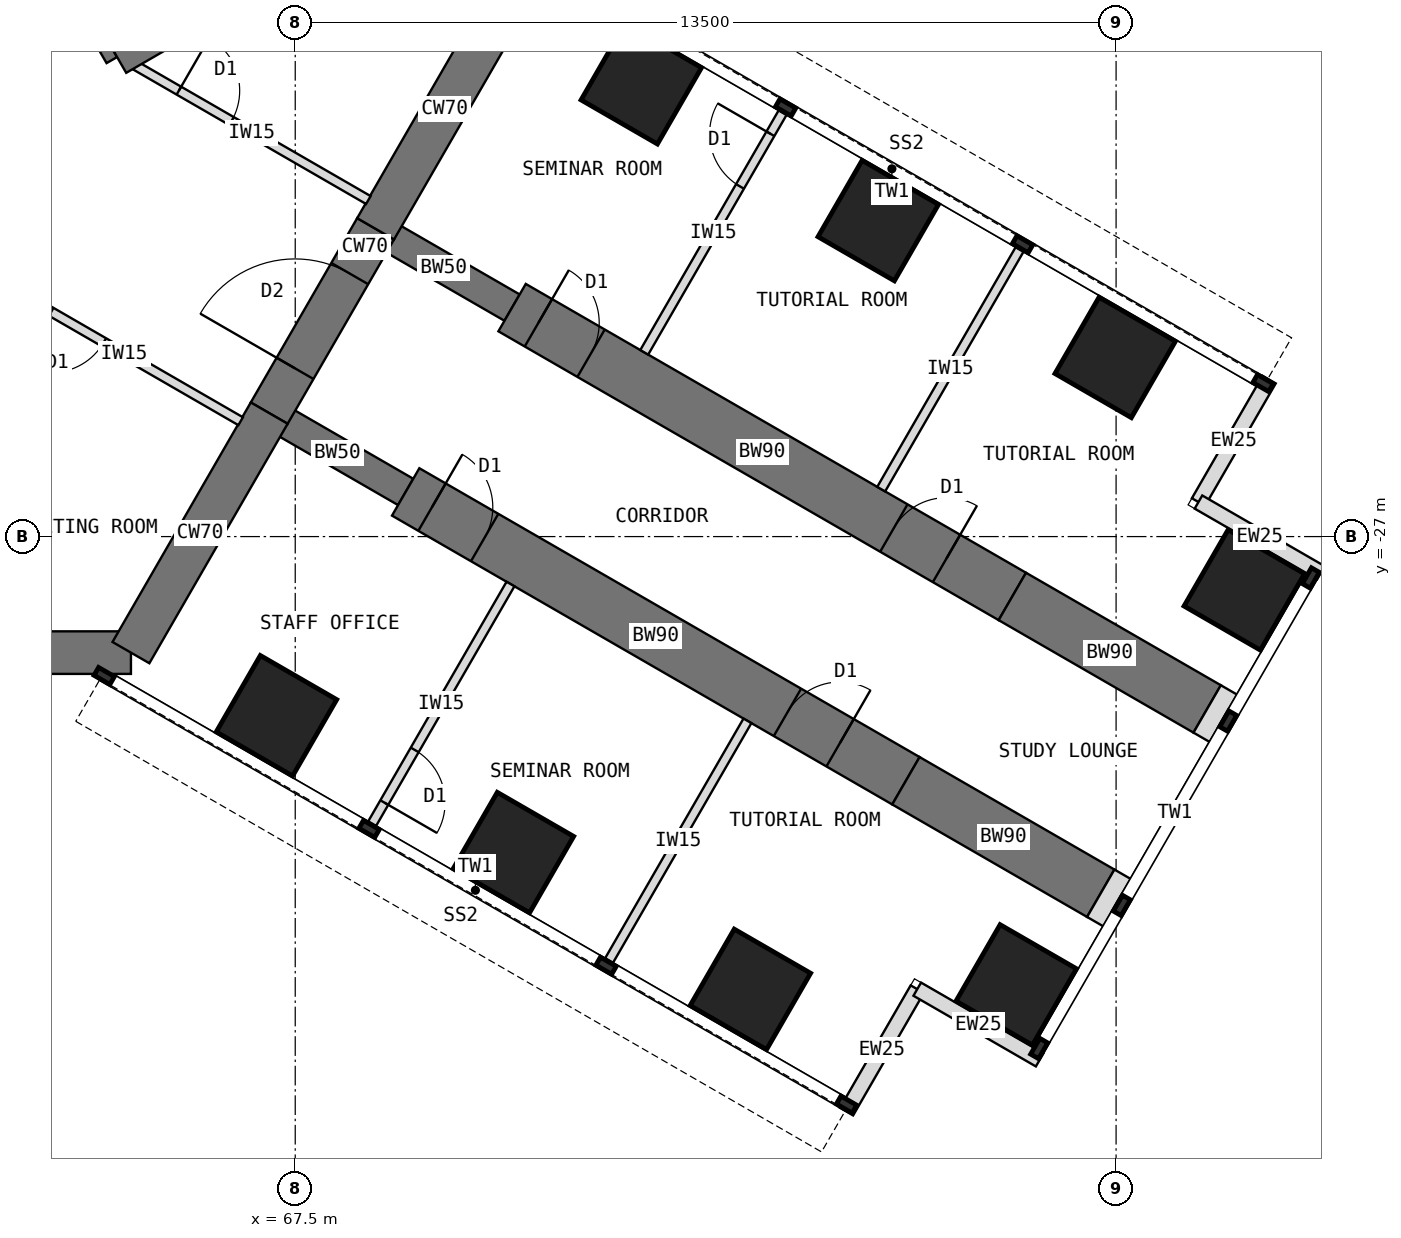
"""IFC4 building model, lengths in metres.
Left out: names, types, materials, properties, quantities, classifications, styles, units other than length and angle.
Written with IfcOpenShell. Run it as: python <this file> out.ifc"""

import sys

from ifc_helpers import new_model, si_unit, direction, frame, frame_2d, origin, origin_2d, place, context, subcontext, project, spatial, rectangle, extrude, element, fill, save


model = new_model("IFC4")
c1 = context("Model", 3, precision=1e-05, world=origin(), true_north=direction((0.0, 1.0)))
c2 = subcontext(c1, "Body", "Model", "MODEL_VIEW")
j1 = project(units=[si_unit("LENGTHUNIT", "METRE"), si_unit("PLANEANGLEUNIT", "RADIAN")], contexts=[c1])
p1 = place(None, origin())
s1 = spatial("IfcSite", under=j1, at=p1, CompositionType="ELEMENT")
p2 = place(p1, origin())
s2 = spatial("IfcBuilding", under=s1, at=p2, CompositionType="ELEMENT")
p3 = place(p2, frame((0.0, 0.0, 60.5)))
s3 = spatial("IfcBuildingStorey", under=s2, at=p3, CompositionType="ELEMENT", Elevation=60.5)
p4 = place(p3, frame((52.202, -28.908, 0.0), z_axis=(0.0, 0.0, 1.0), x_axis=(1.0, 0.0, 0.0)))
e1 = element("IfcWall", 1, at=p4, inside=s3, PredefinedType="SHEAR", context=c2, shape_type="SweptSolid", body=[
    extrude(rectangle(XDim=12.596, YDim=0.7, at=frame_2d((6.298, 0.0))), origin(), (0.0, 0.0, 1.0), 4.0),
])
p5 = place(p3, frame((64.798, -28.908, 0.0), z_axis=(0.0, 0.0, 1.0), x_axis=(0.499984222037, 0.866034513004, 0.0)))
e2 = element("IfcWall", 2, at=p5, inside=s3, PredefinedType="SHEAR", context=c2, shape_type="SweptSolid", body=[
    extrude(rectangle(XDim=4.548, YDim=0.7, at=frame_2d((2.274, 0.0))), origin(), (0.0, 0.0, 1.0), 4.0),
])
p6 = place(p3, frame((67.072, -24.97, 0.0), z_axis=(0.0, 0.0, 1.0), x_axis=(0.500010275428, 0.866019471182, 0.0)))
e3 = element("IfcWall", 3, at=p6, inside=s3, PredefinedType="SHEAR", context=c2, shape_type="SweptSolid", body=[
    extrude(rectangle(XDim=3.5, YDim=0.7, at=frame_2d((1.75, 0.0))), origin(), (0.0, 0.0, 1.0), 4.0),
])
p7 = place(p6, frame((0.85, 0.0, 0.0)))
e4 = element("IfcOpeningElement", 4, at=p7, cuts=e3, PredefinedType="OPENING", context=c2, shape_type="SweptSolid", body=[
    extrude(rectangle(XDim=1.8, YDim=2.1, at=frame_2d((0.9, 1.05))), frame((0.0, 0.36, 0.0), z_axis=(0.0, -1.0, 0.0), x_axis=(1.0, 0.0, 0.0)), (0.0, 0.0, 1.0), 0.72),
])
p8 = place(p3, frame((68.822, -21.939, 0.0), z_axis=(0.0, 0.0, 1.0), x_axis=(0.500024481964, 0.866011268655, 0.0)))
e5 = element("IfcWall", 5, at=p8, inside=s3, PredefinedType="SHEAR", context=c2, shape_type="SweptSolid", body=[
    extrude(rectangle(XDim=4.548, YDim=0.7, at=frame_2d((2.274, 0.0))), origin(), (0.0, 0.0, 1.0), 4.0),
])
p9 = place(p3, frame((68.822, -21.939, 0.0), z_axis=(0.0, 0.0, 1.0), x_axis=(0.866072649678, -0.499918158782, 0.0)))
e6 = element("IfcWall", 6, at=p9, inside=s3, PredefinedType="SHEAR", context=c2, shape_type="SweptSolid", body=[
    extrude(rectangle(XDim=2.592, YDim=0.5, at=frame_2d((1.296, 0.0))), origin(), (0.0, 0.0, 1.0), 4.0),
])
p10 = place(p3, frame((71.066, -23.234, 0.0), z_axis=(0.0, 0.0, 1.0), x_axis=(0.86602681393, -0.499997557548, 0.0)))
e7 = element("IfcWall", 7, at=p10, inside=s3, PredefinedType="SHEAR", context=c2, shape_type="SweptSolid", body=[
    extrude(rectangle(XDim=9.5, YDim=0.9, at=frame_2d((4.75, 0.0))), origin(), (0.0, 0.0, 1.0), 4.0),
])
p11 = place(p10, frame((0.5, 0.0, 0.0)))
e8 = element("IfcOpeningElement", 8, at=p11, cuts=e7, PredefinedType="OPENING", context=c2, shape_type="SweptSolid", body=[
    extrude(rectangle(XDim=1.0, YDim=2.1, at=frame_2d((0.5, 1.05))), frame((0.0, 0.46, 0.0), z_axis=(0.0, -1.0, 0.0), x_axis=(1.0, 0.0, 0.0)), (0.0, 0.0, 1.0), 0.92),
])
p12 = place(p10, frame((7.25, 0.0, 0.0)))
e9 = element("IfcOpeningElement", 9, at=p12, cuts=e7, PredefinedType="OPENING", context=c2, shape_type="SweptSolid", body=[
    extrude(rectangle(XDim=1.0, YDim=2.1, at=frame_2d((0.5, 1.05))), frame((0.0, 0.46, 0.0), z_axis=(0.0, -1.0, 0.0), x_axis=(1.0, 0.0, 0.0)), (0.0, 0.0, 1.0), 0.92),
])
p13 = place(p3, frame((79.294, -27.984, 0.0), z_axis=(0.0, 0.0, 1.0), x_axis=(0.866000971088, -0.500042316284, 0.0)))
e10 = element("IfcWall", 10, at=p13, inside=s3, PredefinedType="SHEAR", context=c2, shape_type="SweptSolid", body=[
    extrude(rectangle(XDim=3.7, YDim=0.9, at=frame_2d((1.85, 0.0))), origin(), (0.0, 0.0, 1.0), 4.0),
])
p14 = place(p3, frame((67.072, -24.97, 0.0), z_axis=(0.0, 0.0, 1.0), x_axis=(0.866031863473, -0.499988811324, 0.0)))
e11 = element("IfcWall", 11, at=p14, inside=s3, PredefinedType="SHEAR", context=c2, shape_type="SweptSolid", body=[
    extrude(rectangle(XDim=2.592, YDim=0.5, at=frame_2d((1.296, 0.0))), origin(), (0.0, 0.0, 1.0), 4.0),
])
p15 = place(p3, frame((69.316, -26.266, 0.0), z_axis=(0.0, 0.0, 1.0), x_axis=(0.86602681393, -0.499997557548, 0.0)))
e12 = element("IfcWall", 12, at=p15, inside=s3, PredefinedType="SHEAR", context=c2, shape_type="SweptSolid", body=[
    extrude(rectangle(XDim=9.5, YDim=0.9, at=frame_2d((4.75, 0.0))), origin(), (0.0, 0.0, 1.0), 4.0),
])
p16 = place(p15, frame((0.5, 0.0, 0.0)))
e13 = element("IfcOpeningElement", 13, at=p16, cuts=e12, PredefinedType="OPENING", context=c2, shape_type="SweptSolid", body=[
    extrude(rectangle(XDim=1.0, YDim=2.1, at=frame_2d((0.5, 1.05))), frame((0.0, 0.46, 0.0), z_axis=(0.0, -1.0, 0.0), x_axis=(1.0, 0.0, 0.0)), (0.0, 0.0, 1.0), 0.92),
])
p17 = place(p15, frame((7.25, 0.0, 0.0)))
e14 = element("IfcOpeningElement", 14, at=p17, cuts=e12, PredefinedType="OPENING", context=c2, shape_type="SweptSolid", body=[
    extrude(rectangle(XDim=1.0, YDim=2.1, at=frame_2d((0.5, 1.05))), frame((0.0, 0.46, 0.0), z_axis=(0.0, -1.0, 0.0), x_axis=(1.0, 0.0, 0.0)), (0.0, 0.0, 1.0), 0.92),
])
p18 = place(p3, frame((77.544, -31.016, 0.0), z_axis=(0.0, 0.0, 1.0), x_axis=(0.866029545028, -0.499992827086, 0.0)))
e15 = element("IfcWall", 15, at=p18, inside=s3, PredefinedType="SHEAR", context=c2, shape_type="SweptSolid", body=[
    extrude(rectangle(XDim=3.7, YDim=0.9, at=frame_2d((1.85, 0.0))), origin(), (0.0, 0.0, 1.0), 4.0),
])
for number, where, z_axis, x_axis in (
    (16, (73.191, -19.554, 0.0), (0.0, 0.0, 1.0), (0.5, 0.866, 0.0)),
    (17, (67.191, -29.946, 0.0), (0.0, 0.0, 1.0), (0.5, 0.866, 0.0)),
    (18, (77.088, -21.804, 0.0), (0.0, 0.0, 1.0), (0.5, 0.866, 0.0)),
    (19, (71.088, -32.196, 0.0), (0.0, 0.0, 1.0), (0.5, 0.866, 0.0)),
    (20, (80.986, -24.054, 0.0), (0.0, 0.0, 1.0), (0.5, 0.866, 0.0)),
    (21, (74.986, -34.446, 0.0), (0.0, 0.0, 1.0), (0.5, 0.866, 0.0)),
    (22, (83.108, -27.877, 0.0), (0.0, 0.0, 1.0), (0.5, 0.866, 0.0)),
    (23, (79.358, -34.373, 0.0), (0.0, 0.0, 1.0), (0.5, 0.866, 0.0)),
):
    element("IfcColumn", number, at=place(p3, frame(where, z_axis=z_axis, x_axis=x_axis)), inside=s3, PredefinedType="COLUMN", context=c2, shape_type="SweptSolid", body=[
        extrude(rectangle(XDim=1.45, YDim=1.45, at=origin_2d()), origin(), (0.0, 0.0, 1.0), 4.0),
    ])
for number, where, z_axis, x_axis in (
    (24, (83.517, -24.419, 0.0), (0.0, 0.0, 1.0), (-0.5, -0.866, 0.0)),
    (25, (82.355, -26.432, 0.0), (0.0, 0.0, 1.0), (0.866, -0.5, 0.0)),
    (26, (76.567, -36.456, 0.0), (0.0, 0.0, 1.0), (0.5, 0.866, 0.0)),
    (27, (77.73, -34.443, 0.0), (0.0, 0.0, 1.0), (0.866, -0.5, 0.0)),
):
    element("IfcWall", number, at=place(p3, frame(where, z_axis=z_axis, x_axis=x_axis)), inside=s3, PredefinedType="STANDARD", context=c2, shape_type="SweptSolid", body=[
        extrude(rectangle(XDim=2.325, YDim=0.25, at=frame_2d((1.163, 0.0))), origin(), (0.0, 0.0, 1.0), 3.8),
    ])
for number, where, z_axis, x_axis in (
    (28, (82.498, -29.834, 0.0), (0.0, 0.0, 1.0), (0.866, -0.5, 0.0)),
    (29, (80.748, -32.865, 0.0), (0.0, 0.0, 1.0), (0.866, -0.5, 0.0)),
):
    element("IfcWall", number, at=place(p3, frame(where, z_axis=z_axis, x_axis=x_axis)), inside=s3, PredefinedType="PARTITIONING", context=c2, shape_type="SweptSolid", body=[
        extrude(rectangle(XDim=0.31, YDim=0.9, at=frame_2d((0.155, 0.0))), origin(), (0.0, 0.0, 1.0), 3.8),
    ])
p19 = place(p3, frame((64.484, -19.164, 0.0), z_axis=(0.0, 0.0, 1.0), x_axis=(-0.49999894854, 0.866026010844, 0.0)))
e30 = element("IfcWall", 30, at=p19, inside=s3, PredefinedType="SHEAR", context=c2, shape_type="SweptSolid", body=[
    extrude(rectangle(XDim=8.0, YDim=0.2, at=frame_2d((4.0, 0.0))), origin(), (0.0, 0.0, 1.0), 4.0),
])
p20 = place(p19, frame((6.3, 0.0, 0.0)))
e31 = element("IfcOpeningElement", 31, at=p20, cuts=e30, PredefinedType="OPENING", context=c2, shape_type="SweptSolid", body=[
    extrude(rectangle(XDim=1.2, YDim=2.1, at=frame_2d((0.6, 1.05))), frame((0.0, 0.11, 0.0), z_axis=(0.0, -1.0, 0.0), x_axis=(1.0, 0.0, 0.0)), (0.0, 0.0, 1.0), 0.22),
])
p21 = place(p19, frame((0.9, 0.0, 0.0)))
e32 = element("IfcOpeningElement", 32, at=p21, cuts=e30, PredefinedType="OPENING", context=c2, shape_type="SweptSolid", body=[
    extrude(rectangle(XDim=1.1, YDim=2.2, at=frame_2d((0.55, 1.1))), frame((0.0, 0.11, 0.0), z_axis=(0.0, -1.0, 0.0), x_axis=(1.0, 0.0, 0.0)), (0.0, 0.0, 1.0), 0.22),
])
p22 = place(p19, frame((3.8, 0.0, 0.0)))
e33 = element("IfcOpeningElement", 33, at=p22, cuts=e30, PredefinedType="OPENING", context=c2, shape_type="SweptSolid", body=[
    extrude(rectangle(XDim=1.1, YDim=2.2, at=frame_2d((0.55, 1.1))), frame((0.0, 0.11, 0.0), z_axis=(0.0, -1.0, 0.0), x_axis=(1.0, 0.0, 0.0)), (0.0, 0.0, 1.0), 0.22),
])
p23 = place(p3, frame((64.62, -19.201, 0.0), z_axis=(0.0, 0.0, 1.0), x_axis=(0.866023886965, 0.500002627198, 0.0)))
e34 = element("IfcWall", 34, at=p23, inside=s3, PredefinedType="SHEAR", context=c2, shape_type="SweptSolid", body=[
    extrude(rectangle(XDim=5.858, YDim=0.4, at=frame_2d((2.929, 0.0))), origin(), (0.0, 0.0, 1.0), 4.0),
])
p24 = place(p3, frame((73.24, -23.97, 0.0), z_axis=(0.0, 0.0, 1.0), x_axis=(0.499982560684, 0.866035472144, 0.0)))
e35 = element("IfcWall", 35, at=p24, inside=s3, PredefinedType="PARTITIONING", context=c2, shape_type="SweptSolid", body=[
    extrude(rectangle(XDim=4.55, YDim=0.15, at=frame_2d((2.275, 0.0))), origin(), (0.0, 0.0, 1.0), 3.8),
])
p25 = place(p24, frame((3.15, 0.0, 0.0)))
e36 = element("IfcOpeningElement", 36, at=p25, cuts=e35, PredefinedType="OPENING", context=c2, shape_type="SweptSolid", body=[
    extrude(rectangle(XDim=1.0, YDim=2.1, at=frame_2d((0.5, 1.05))), frame((0.0, 0.085, 0.0), z_axis=(0.0, -1.0, 0.0), x_axis=(1.0, 0.0, 0.0)), (0.0, 0.0, 1.0), 0.17),
])
p26 = place(p3, frame((77.137, -26.22, 0.0), z_axis=(0.0, 0.0, 1.0), x_axis=(0.500022803284, 0.866012237902, 0.0)))
e37 = element("IfcWall", 37, at=p26, inside=s3, PredefinedType="PARTITIONING", context=c2, shape_type="SweptSolid", body=[
    extrude(rectangle(XDim=4.55, YDim=0.15, at=frame_2d((2.275, 0.0))), origin(), (0.0, 0.0, 1.0), 3.8),
])
p27 = place(p3, frame((71.04, -27.78, 0.0), z_axis=(0.0, 0.0, 1.0), x_axis=(-0.499982560684, -0.866035472144, 0.0)))
e38 = element("IfcWall", 38, at=p27, inside=s3, PredefinedType="PARTITIONING", context=c2, shape_type="SweptSolid", body=[
    extrude(rectangle(XDim=4.55, YDim=0.15, at=frame_2d((2.275, 0.0))), origin(), (0.0, 0.0, 1.0), 3.8),
])
p28 = place(p27, frame((3.15, 0.0, 0.0)))
e39 = element("IfcOpeningElement", 39, at=p28, cuts=e38, PredefinedType="OPENING", context=c2, shape_type="SweptSolid", body=[
    extrude(rectangle(XDim=1.0, YDim=2.1, at=frame_2d((0.5, 1.05))), frame((0.0, 0.085, 0.0), z_axis=(0.0, -1.0, 0.0), x_axis=(1.0, 0.0, 0.0)), (0.0, 0.0, 1.0), 0.17),
])
p29 = place(p3, frame((74.937, -30.03, 0.0), z_axis=(0.0, 0.0, 1.0), x_axis=(-0.499982560684, -0.866035472144, 0.0)))
e40 = element("IfcWall", 40, at=p29, inside=s3, PredefinedType="PARTITIONING", context=c2, shape_type="SweptSolid", body=[
    extrude(rectangle(XDim=4.55, YDim=0.15, at=frame_2d((2.275, 0.0))), origin(), (0.0, 0.0, 1.0), 3.8),
])
p30 = place(p3, frame((64.87, -19.253, 0.0), z_axis=(0.0, 0.0, 1.0), x_axis=(0.866021148949, -0.500007369519, 0.0)))
e41 = element("IfcWall", 41, at=p30, inside=s3, PredefinedType="PARTITIONING", context=c2, shape_type="SweptSolid", body=[
    extrude(rectangle(XDim=4.426, YDim=0.15, at=frame_2d((2.213, 0.0))), origin(), (0.0, 0.0, 1.0), 3.8),
])
p31 = place(p30, frame((0.828, 0.0, 0.0)))
e42 = element("IfcOpeningElement", 42, at=p31, cuts=e41, PredefinedType="OPENING", context=c2, shape_type="SweptSolid", body=[
    extrude(rectangle(XDim=1.0, YDim=2.1, at=frame_2d((0.5, 1.05))), frame((0.0, 0.085, 0.0), z_axis=(0.0, -1.0, 0.0), x_axis=(1.0, 0.0, 0.0)), (0.0, 0.0, 1.0), 0.17),
])
p32 = place(p3, frame((66.603, -25.103, 0.0), z_axis=(0.0, 0.0, 1.0), x_axis=(-0.866021148949, 0.500007369519, 0.0)))
e43 = element("IfcWall", 43, at=p32, inside=s3, PredefinedType="PARTITIONING", context=c2, shape_type="SweptSolid", body=[
    extrude(rectangle(XDim=4.426, YDim=0.15, at=frame_2d((2.213, 0.0))), origin(), (0.0, 0.0, 1.0), 3.8),
])
p33 = place(p32, frame((2.598, 0.0, 0.0)))
e44 = element("IfcOpeningElement", 44, at=p33, cuts=e43, PredefinedType="OPENING", context=c2, shape_type="SweptSolid", body=[
    extrude(rectangle(XDim=1.0, YDim=2.1, at=frame_2d((0.5, 1.05))), frame((0.0, 0.085, 0.0), z_axis=(0.0, -1.0, 0.0), x_axis=(1.0, 0.0, 0.0)), (0.0, 0.0, 1.0), 0.17),
])
p34 = place(p7, origin())
e45 = element("IfcDoor", 45, at=p34, inside=s3, OperationType="DOUBLE_DOOR_DOUBLE_SWING", PredefinedType="DOOR", context=c2, shape_type="SweptSolid", body=[
    extrude(rectangle(XDim=1.72, YDim=2.06, at=frame_2d((0.9, 1.03))), frame((0.0, 0.025, 0.0), z_axis=(0.0, -1.0, 0.0), x_axis=(1.0, 0.0, 0.0)), (0.0, 0.0, 1.0), 0.05),
    extrude(rectangle(XDim=0.04, YDim=2.1, at=frame_2d((0.02, 1.05))), frame((0.0, 0.35, 0.0), z_axis=(0.0, -1.0, 0.0), x_axis=(1.0, 0.0, 0.0)), (0.0, 0.0, 1.0), 0.699),
    extrude(rectangle(XDim=0.04, YDim=2.1, at=frame_2d((1.78, 1.05))), frame((0.0, 0.35, 0.0), z_axis=(0.0, -1.0, 0.0), x_axis=(1.0, 0.0, 0.0)), (0.0, 0.0, 1.0), 0.699),
    extrude(rectangle(XDim=1.72, YDim=0.04, at=frame_2d((0.9, 2.08))), frame((0.0, 0.35, 0.0), z_axis=(0.0, -1.0, 0.0), x_axis=(1.0, 0.0, 0.0)), (0.0, 0.0, 1.0), 0.699),
])
fill(e4, e45)
p35 = place(p25, origin())
e46 = element("IfcDoor", 46, at=p35, inside=s3, OperationType="SINGLE_SWING_RIGHT", PredefinedType="DOOR", context=c2, shape_type="SweptSolid", body=[
    extrude(rectangle(XDim=1.0, YDim=2.1, at=frame_2d((0.5, 1.05))), frame((0.0, 0.025, 0.0), z_axis=(0.0, -1.0, 0.0), x_axis=(1.0, 0.0, 0.0)), (0.0, 0.0, 1.0), 0.05),
])
fill(e36, e46)
p36 = place(p28, origin())
e47 = element("IfcDoor", 47, at=p36, inside=s3, OperationType="SINGLE_SWING_RIGHT", PredefinedType="DOOR", context=c2, shape_type="SweptSolid", body=[
    extrude(rectangle(XDim=1.0, YDim=2.1, at=frame_2d((0.5, 1.05))), frame((0.0, 0.025, 0.0), z_axis=(0.0, -1.0, 0.0), x_axis=(1.0, 0.0, 0.0)), (0.0, 0.0, 1.0), 0.05),
])
fill(e39, e47)
p37 = place(p33, origin())
e48 = element("IfcDoor", 48, at=p37, inside=s3, OperationType="SINGLE_SWING_RIGHT", PredefinedType="DOOR", context=c2, shape_type="SweptSolid", body=[
    extrude(rectangle(XDim=1.0, YDim=2.1, at=frame_2d((0.5, 1.05))), frame((0.0, 0.025, 0.0), z_axis=(0.0, -1.0, 0.0), x_axis=(1.0, 0.0, 0.0)), (0.0, 0.0, 1.0), 0.05),
])
fill(e44, e48)
p38 = place(p31, origin())
e49 = element("IfcDoor", 49, at=p38, inside=s3, OperationType="SINGLE_SWING_LEFT", PredefinedType="DOOR", context=c2, shape_type="SweptSolid", body=[
    extrude(rectangle(XDim=1.0, YDim=2.1, at=frame_2d((0.5, 1.05))), frame((0.0, 0.025, 0.0), z_axis=(0.0, -1.0, 0.0), x_axis=(1.0, 0.0, 0.0)), (0.0, 0.0, 1.0), 0.05),
])
fill(e42, e49)
p39 = place(p11, origin())
e50 = element("IfcDoor", 50, at=p39, inside=s3, OperationType="SINGLE_SWING_LEFT", PredefinedType="DOOR", context=c2, shape_type="SweptSolid", body=[
    extrude(rectangle(XDim=0.92, YDim=2.06, at=frame_2d((0.5, 1.03))), frame((0.0, 0.025, 0.0), z_axis=(0.0, -1.0, 0.0), x_axis=(1.0, 0.0, 0.0)), (0.0, 0.0, 1.0), 0.05),
    extrude(rectangle(XDim=0.04, YDim=2.1, at=frame_2d((0.02, 1.05))), frame((0.0, 0.45, 0.0), z_axis=(0.0, -1.0, 0.0), x_axis=(1.0, 0.0, 0.0)), (0.0, 0.0, 1.0), 0.899),
    extrude(rectangle(XDim=0.04, YDim=2.1, at=frame_2d((0.98, 1.05))), frame((0.0, 0.45, 0.0), z_axis=(0.0, -1.0, 0.0), x_axis=(1.0, 0.0, 0.0)), (0.0, 0.0, 1.0), 0.899),
    extrude(rectangle(XDim=0.92, YDim=0.04, at=frame_2d((0.5, 2.08))), frame((0.0, 0.45, 0.0), z_axis=(0.0, -1.0, 0.0), x_axis=(1.0, 0.0, 0.0)), (0.0, 0.0, 1.0), 0.899),
])
fill(e8, e50)
p40 = place(p12, origin())
e51 = element("IfcDoor", 51, at=p40, inside=s3, OperationType="SINGLE_SWING_RIGHT", PredefinedType="DOOR", context=c2, shape_type="SweptSolid", body=[
    extrude(rectangle(XDim=0.92, YDim=2.06, at=frame_2d((0.5, 1.03))), frame((0.0, 0.025, 0.0), z_axis=(0.0, -1.0, 0.0), x_axis=(1.0, 0.0, 0.0)), (0.0, 0.0, 1.0), 0.05),
    extrude(rectangle(XDim=0.04, YDim=2.1, at=frame_2d((0.02, 1.05))), frame((0.0, 0.45, 0.0), z_axis=(0.0, -1.0, 0.0), x_axis=(1.0, 0.0, 0.0)), (0.0, 0.0, 1.0), 0.899),
    extrude(rectangle(XDim=0.04, YDim=2.1, at=frame_2d((0.98, 1.05))), frame((0.0, 0.45, 0.0), z_axis=(0.0, -1.0, 0.0), x_axis=(1.0, 0.0, 0.0)), (0.0, 0.0, 1.0), 0.899),
    extrude(rectangle(XDim=0.92, YDim=0.04, at=frame_2d((0.5, 2.08))), frame((0.0, 0.45, 0.0), z_axis=(0.0, -1.0, 0.0), x_axis=(1.0, 0.0, 0.0)), (0.0, 0.0, 1.0), 0.899),
])
fill(e9, e51)
p41 = place(p16, origin())
e52 = element("IfcDoor", 52, at=p41, inside=s3, OperationType="SINGLE_SWING_LEFT", PredefinedType="DOOR", context=c2, shape_type="SweptSolid", body=[
    extrude(rectangle(XDim=0.92, YDim=2.06, at=frame_2d((0.5, 1.03))), frame((0.0, 0.025, 0.0), z_axis=(0.0, -1.0, 0.0), x_axis=(1.0, 0.0, 0.0)), (0.0, 0.0, 1.0), 0.05),
    extrude(rectangle(XDim=0.04, YDim=2.1, at=frame_2d((0.02, 1.05))), frame((0.0, 0.45, 0.0), z_axis=(0.0, -1.0, 0.0), x_axis=(1.0, 0.0, 0.0)), (0.0, 0.0, 1.0), 0.899),
    extrude(rectangle(XDim=0.04, YDim=2.1, at=frame_2d((0.98, 1.05))), frame((0.0, 0.45, 0.0), z_axis=(0.0, -1.0, 0.0), x_axis=(1.0, 0.0, 0.0)), (0.0, 0.0, 1.0), 0.899),
    extrude(rectangle(XDim=0.92, YDim=0.04, at=frame_2d((0.5, 2.08))), frame((0.0, 0.45, 0.0), z_axis=(0.0, -1.0, 0.0), x_axis=(1.0, 0.0, 0.0)), (0.0, 0.0, 1.0), 0.899),
])
fill(e13, e52)
p42 = place(p17, origin())
e53 = element("IfcDoor", 53, at=p42, inside=s3, OperationType="SINGLE_SWING_RIGHT", PredefinedType="DOOR", context=c2, shape_type="SweptSolid", body=[
    extrude(rectangle(XDim=0.92, YDim=2.06, at=frame_2d((0.5, 1.03))), frame((0.0, 0.025, 0.0), z_axis=(0.0, -1.0, 0.0), x_axis=(1.0, 0.0, 0.0)), (0.0, 0.0, 1.0), 0.05),
    extrude(rectangle(XDim=0.04, YDim=2.1, at=frame_2d((0.02, 1.05))), frame((0.0, 0.45, 0.0), z_axis=(0.0, -1.0, 0.0), x_axis=(1.0, 0.0, 0.0)), (0.0, 0.0, 1.0), 0.899),
    extrude(rectangle(XDim=0.04, YDim=2.1, at=frame_2d((0.98, 1.05))), frame((0.0, 0.45, 0.0), z_axis=(0.0, -1.0, 0.0), x_axis=(1.0, 0.0, 0.0)), (0.0, 0.0, 1.0), 0.899),
    extrude(rectangle(XDim=0.92, YDim=0.04, at=frame_2d((0.5, 2.08))), frame((0.0, 0.45, 0.0), z_axis=(0.0, -1.0, 0.0), x_axis=(1.0, 0.0, 0.0)), (0.0, 0.0, 1.0), 0.899),
])
fill(e14, e53)
save(model, sys.argv[1])
